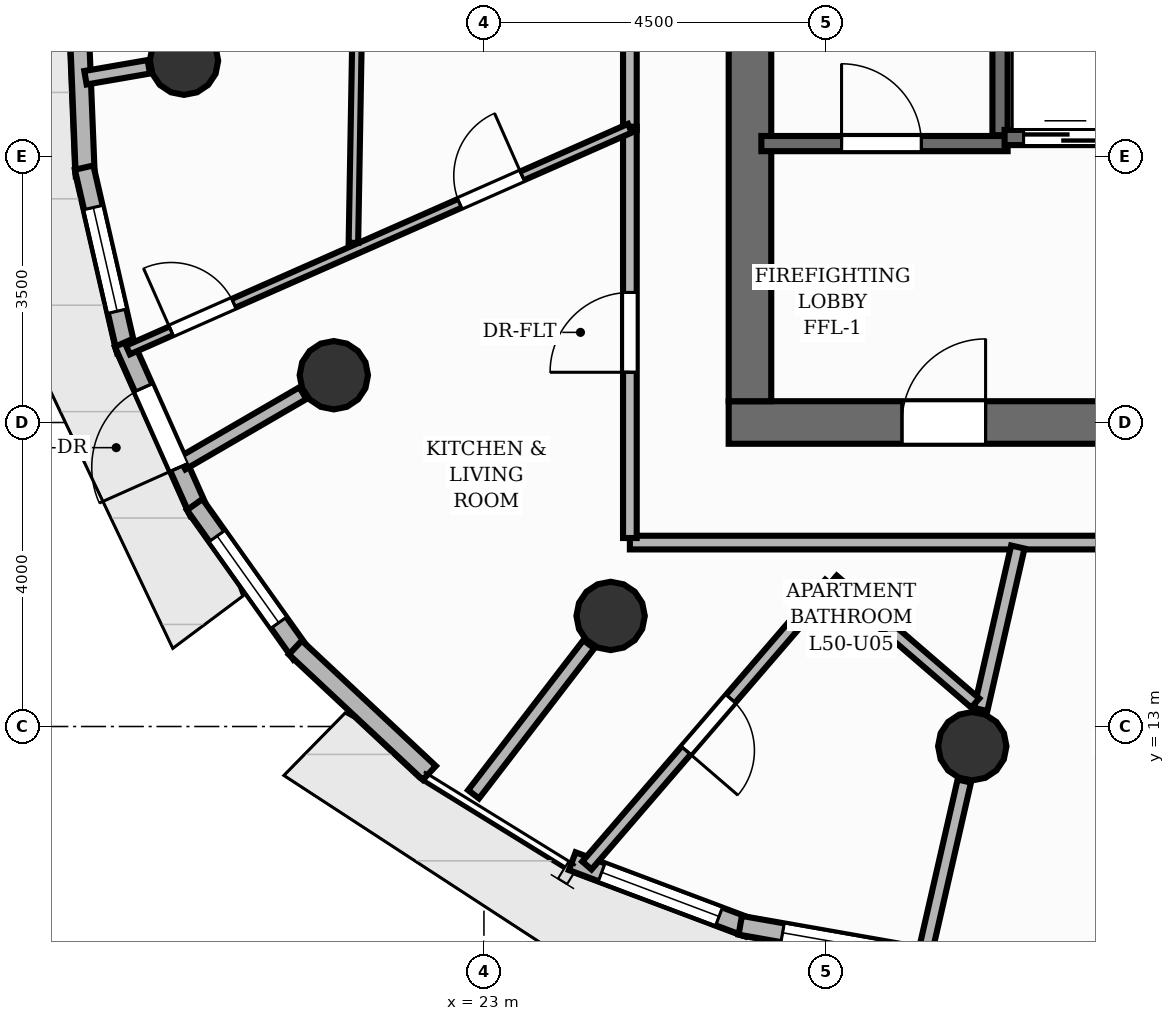
"""IFC4 building model, lengths in metres.
Left out: names, types, materials, properties, quantities, classifications, styles, units other than length and angle.
Written with IfcOpenShell. Run it as: python <this file> out.ifc"""

import sys

from ifc_helpers import new_model, si_unit, direction, frame, frame_2d, origin, origin_2d, place, context, subcontext, project, spatial, rectangle, circle, extrude, element, fill, save


model = new_model("IFC4")
c1 = context("Model", 3, precision=1e-05, world=origin(), true_north=direction((0.0, 1.0)))
c2 = subcontext(c1, "Body", "Model", "MODEL_VIEW")
j1 = project(units=[si_unit("LENGTHUNIT", "METRE"), si_unit("PLANEANGLEUNIT", "RADIAN")], contexts=[c1])
p1 = place(None, origin())
s1 = spatial("IfcSite", under=j1, at=p1, CompositionType="ELEMENT")
p2 = place(p1, origin())
s2 = spatial("IfcBuilding", under=s1, at=p2, CompositionType="ELEMENT")
p3 = place(p2, frame((0.0, 0.0, 169.44)))
s3 = spatial("IfcBuildingStorey", under=s2, at=p3, CompositionType="ELEMENT", Elevation=169.44)
p4 = place(p3, frame((26.22, 17.0, 0.0), z_axis=(0.0, 0.0, 1.0), x_axis=(1.0, 0.0, 0.0)))
e1 = element("IfcWall", 1, at=p4, inside=s3, PredefinedType="SHEAR", context=c2, shape_type="SweptSolid", body=[
    extrude(rectangle(XDim=11.56, YDim=0.56, at=frame_2d((5.78, 0.0))), origin(), (0.0, 0.0, 1.0), 3.2),
])
p5 = place(p4, frame((2.28, 0.0, 0.0)))
e2 = element("IfcOpeningElement", 2, at=p5, cuts=e1, PredefinedType="OPENING", context=c2, shape_type="SweptSolid", body=[
    extrude(rectangle(XDim=1.1, YDim=2.15, at=frame_2d((0.55, 1.075))), frame((0.0, 0.29, 0.0), z_axis=(0.0, -1.0, 0.0), x_axis=(1.0, 0.0, 0.0)), (0.0, 0.0, 1.0), 0.58),
])
p6 = place(p4, frame((5.83, 0.0, 0.0)))
e3 = element("IfcOpeningElement", 3, at=p6, cuts=e1, PredefinedType="OPENING", context=c2, shape_type="SweptSolid", body=[
    extrude(rectangle(XDim=0.9, YDim=2.1, at=frame_2d((0.45, 1.05))), frame((0.0, 0.29, 0.0), z_axis=(0.0, -1.0, 0.0), x_axis=(1.0, 0.0, 0.0)), (0.0, 0.0, 1.0), 0.58),
])
p7 = place(p3, frame((26.5, 17.28, 0.0), z_axis=(0.0, 0.0, 1.0), x_axis=(0.0, 1.0, 0.0)))
e4 = element("IfcWall", 4, at=p7, inside=s3, PredefinedType="SHEAR", context=c2, shape_type="SweptSolid", body=[
    extrude(rectangle(XDim=13.44, YDim=0.56, at=frame_2d((6.72, 0.0))), origin(), (0.0, 0.0, 1.0), 3.2),
])
for number, where, z_axis, x_axis in (
    (5, (19.054, 21.76, 0.0), (0.0, 0.0, 1.0), (1.0, 0.0, 0.0)),
    (6, (21.025, 17.622, 0.0), (0.0, 0.0, 1.0), (1.0, 0.0, 0.0)),
    (7, (24.667, 14.455, 0.0), (0.0, 0.0, 1.0), (1.0, 0.0, 0.0)),
    (8, (29.425, 12.74, 0.0), (0.0, 0.0, 1.0), (1.0, 0.0, 0.0)),
):
    element("IfcColumn", number, at=place(p3, frame(where, z_axis=z_axis, x_axis=x_axis)), inside=s3, PredefinedType="COLUMN", context=c2, shape_type="SweptSolid", body=[
        extrude(circle(Radius=0.45, at=origin_2d()), origin(), (0.0, 0.0, 1.0), 3.2),
    ])
p8 = place(p3, frame((17.755, 20.242, 0.0), z_axis=(0.0, 0.0, 1.0), x_axis=(-0.040399298921, 0.999183615081, 0.0)))
e9 = element("IfcWall", 9, at=p8, inside=s3, PredefinedType="SOLIDWALL", context=c2, shape_type="SweptSolid", body=[
    extrude(rectangle(XDim=2.532, YDim=0.25, at=frame_2d((1.266, 0.0))), origin(), (0.0, 0.0, 1.0), 2.96),
])
p9 = place(p3, frame((18.295, 17.939, 0.0), z_axis=(0.0, 0.0, 1.0), x_axis=(-0.224175769227, 0.974548728639, 0.0)))
e10 = element("IfcWall", 10, at=p9, inside=s3, PredefinedType="SOLIDWALL", context=c2, shape_type="SweptSolid", body=[
    extrude(rectangle(XDim=2.478, YDim=0.25, at=frame_2d((1.239, 0.0))), origin(), (0.0, 0.0, 1.0), 2.96),
])
p10 = place(p9, frame((0.539, 0.0, 0.85)))
e11 = element("IfcOpeningElement", 11, at=p10, cuts=e10, PredefinedType="OPENING", context=c2, shape_type="SweptSolid", body=[
    extrude(rectangle(XDim=1.4, YDim=1.55, at=frame_2d((0.7, 0.775))), frame((0.0, 0.135, 0.0), z_axis=(0.0, -1.0, 0.0), x_axis=(1.0, 0.0, 0.0)), (0.0, 0.0, 1.0), 0.27),
])
p11 = place(p3, frame((19.251, 15.821, 0.0), z_axis=(0.0, 0.0, 1.0), x_axis=(-0.407346511056, 0.913273682929, 0.0)))
e12 = element("IfcWall", 12, at=p11, inside=s3, PredefinedType="SOLIDWALL", context=c2, shape_type="SweptSolid", body=[
    extrude(rectangle(XDim=2.437, YDim=0.25, at=frame_2d((1.219, 0.0))), origin(), (0.0, 0.0, 1.0), 2.96),
])
p12 = place(p11, frame((0.643, 0.0, 0.0)))
e13 = element("IfcOpeningElement", 13, at=p12, cuts=e12, PredefinedType="OPENING", context=c2, shape_type="SweptSolid", body=[
    extrude(rectangle(XDim=1.15, YDim=2.2, at=frame_2d((0.575, 1.1))), frame((0.0, 0.135, 0.0), z_axis=(0.0, -1.0, 0.0), x_axis=(1.0, 0.0, 0.0)), (0.0, 0.0, 1.0), 0.27),
])
p13 = place(p3, frame((20.594, 13.953, 0.0), z_axis=(0.0, 0.0, 1.0), x_axis=(-0.579505880656, 0.814968057217, 0.0)))
e14 = element("IfcWall", 14, at=p13, inside=s3, PredefinedType="SOLIDWALL", context=c2, shape_type="SweptSolid", body=[
    extrude(rectangle(XDim=2.415, YDim=0.25, at=frame_2d((1.208, 0.0))), origin(), (0.0, 0.0, 1.0), 2.96),
])
p14 = place(p13, frame((0.507, 0.0, 0.85)))
e15 = element("IfcOpeningElement", 15, at=p14, cuts=e14, PredefinedType="OPENING", context=c2, shape_type="SweptSolid", body=[
    extrude(rectangle(XDim=1.4, YDim=1.55, at=frame_2d((0.7, 0.775))), frame((0.0, 0.135, 0.0), z_axis=(0.0, -1.0, 0.0), x_axis=(1.0, 0.0, 0.0)), (0.0, 0.0, 1.0), 0.27),
])
p15 = place(p3, frame((22.282, 12.389, 0.0), z_axis=(0.0, 0.0, 1.0), x_axis=(-0.730224222865, 0.683207570465, 0.0)))
e16 = element("IfcWall", 16, at=p15, inside=s3, PredefinedType="SOLIDWALL", context=c2, shape_type="SweptSolid", body=[
    extrude(rectangle(XDim=2.415, YDim=0.25, at=frame_2d((1.207, 0.0))), origin(), (0.0, 0.0, 1.0), 2.96),
])
p16 = place(p3, frame((26.481, 10.355, 0.0), z_axis=(0.0, 0.0, 1.0), x_axis=(-0.93586674787, 0.352354126172, 0.0)))
e17 = element("IfcWall", 17, at=p16, inside=s3, PredefinedType="SOLIDWALL", context=c2, shape_type="SweptSolid", body=[
    extrude(rectangle(XDim=2.478, YDim=0.25, at=frame_2d((1.239, 0.0))), origin(), (0.0, 0.0, 1.0), 2.96),
])
p17 = place(p16, frame((0.414, 0.0, 0.85)))
e18 = element("IfcOpeningElement", 18, at=p17, cuts=e17, PredefinedType="OPENING", context=c2, shape_type="SweptSolid", body=[
    extrude(rectangle(XDim=1.65, YDim=1.55, at=frame_2d((0.825, 0.775))), frame((0.0, 0.135, 0.0), z_axis=(0.0, -1.0, 0.0), x_axis=(1.0, 0.0, 0.0)), (0.0, 0.0, 1.0), 0.27),
])
p18 = place(p3, frame((28.865, 9.945, 0.0), z_axis=(0.0, 0.0, 1.0), x_axis=(-0.984837873762, 0.173477267688, 0.0)))
e19 = element("IfcWall", 19, at=p18, inside=s3, PredefinedType="SOLIDWALL", context=c2, shape_type="SweptSolid", body=[
    extrude(rectangle(XDim=2.532, YDim=0.25, at=frame_2d((1.266, 0.0))), origin(), (0.0, 0.0, 1.0), 2.96),
])
p19 = place(p18, frame((0.566, 0.0, 0.85)))
e20 = element("IfcOpeningElement", 20, at=p19, cuts=e19, PredefinedType="OPENING", context=c2, shape_type="SweptSolid", body=[
    extrude(rectangle(XDim=1.4, YDim=1.55, at=frame_2d((0.7, 0.775))), frame((0.0, 0.135, 0.0), z_axis=(0.0, -1.0, 0.0), x_axis=(1.0, 0.0, 0.0)), (0.0, 0.0, 1.0), 0.27),
])
p20 = place(p3, frame((29.79, 20.78, 0.0), z_axis=(0.0, 0.0, 1.0), x_axis=(0.0, 1.0, 0.0)))
e21 = element("IfcWall", 21, at=p20, inside=s3, PredefinedType="SHEAR", context=c2, shape_type="SweptSolid", body=[
    extrude(rectangle(XDim=6.44, YDim=0.2, at=frame_2d((3.22, 0.0))), origin(), (0.0, 0.0, 1.0), 3.2),
])
p21 = place(p3, frame((26.65, 20.67, 0.0), z_axis=(0.0, 0.0, 1.0), x_axis=(1.0, 0.0, 0.0)))
e22 = element("IfcWall", 22, at=p21, inside=s3, PredefinedType="SHEAR", context=c2, shape_type="SweptSolid", body=[
    extrude(rectangle(XDim=3.24, YDim=0.2, at=frame_2d((1.62, 0.0))), origin(), (0.0, 0.0, 1.0), 3.2),
])
p22 = place(p21, frame((1.055, 0.0, 0.0)))
e23 = element("IfcOpeningElement", 23, at=p22, cuts=e22, PredefinedType="OPENING", context=c2, shape_type="SweptSolid", body=[
    extrude(rectangle(XDim=1.05, YDim=2.15, at=frame_2d((0.525, 1.075))), frame((0.0, 0.11, 0.0), z_axis=(0.0, -1.0, 0.0), x_axis=(1.0, 0.0, 0.0)), (0.0, 0.0, 1.0), 0.22),
])
p23 = place(p3, frame((29.85, 20.75, 0.0), z_axis=(0.0, 0.0, 1.0), x_axis=(1.0, 0.0, 0.0)))
e24 = element("IfcWall", 24, at=p23, inside=s3, PredefinedType="SHEAR", context=c2, shape_type="SweptSolid", body=[
    extrude(rectangle(XDim=2.3, YDim=0.2, at=frame_2d((1.15, 0.0))), origin(), (0.0, 0.0, 1.0), 3.2),
])
p24 = place(p23, frame((0.25, 0.0, 0.0)))
e25 = element("IfcOpeningElement", 25, at=p24, cuts=e24, PredefinedType="OPENING", context=c2, shape_type="SweptSolid", body=[
    extrude(rectangle(XDim=1.1, YDim=2.15, at=frame_2d((0.55, 1.075))), frame((0.0, 0.11, 0.0), z_axis=(0.0, -1.0, 0.0), x_axis=(1.0, 0.0, 0.0)), (0.0, 0.0, 1.0), 0.22),
])
p25 = place(p3, frame((18.591, 21.68, 0.0), z_axis=(0.0, 0.0, 1.0), x_axis=(-0.985336508055, -0.170622290144, 0.0)))
e26 = element("IfcWall", 26, at=p25, inside=s3, PredefinedType="PARTITIONING", context=c2, shape_type="SweptSolid", body=[
    extrude(rectangle(XDim=0.846, YDim=0.18, at=frame_2d((0.423, 0.0))), origin(), (0.0, 0.0, 1.0), 2.404),
])
p26 = place(p3, frame((20.618, 17.386, 0.0), z_axis=(0.0, 0.0, 1.0), x_axis=(-0.864604991586, -0.502452195264, 0.0)))
e27 = element("IfcWall", 27, at=p26, inside=s3, PredefinedType="PARTITIONING", context=c2, shape_type="SweptSolid", body=[
    extrude(rectangle(XDim=1.841, YDim=0.18, at=frame_2d((0.92, 0.0))), origin(), (0.0, 0.0, 1.0), 2.404),
])
p27 = place(p3, frame((24.38, 14.082, 0.0), z_axis=(0.0, 0.0, 1.0), x_axis=(-0.609279402228, -0.792955616678, 0.0)))
e28 = element("IfcWall", 28, at=p27, inside=s3, PredefinedType="PARTITIONING", context=c2, shape_type="SweptSolid", body=[
    extrude(rectangle(XDim=2.49, YDim=0.18, at=frame_2d((1.245, 0.0))), origin(), (0.0, 0.0, 1.0), 2.404),
])
p28 = place(p3, frame((29.32, 12.282, 0.0), z_axis=(0.0, 0.0, 1.0), x_axis=(-0.222998449778, -0.974818799263, 0.0)))
e29 = element("IfcWall", 29, at=p28, inside=s3, PredefinedType="PARTITIONING", context=c2, shape_type="SweptSolid", body=[
    extrude(rectangle(XDim=2.329, YDim=0.18, at=frame_2d((1.164, 0.0))), origin(), (0.0, 0.0, 1.0), 2.404),
])
p29 = place(p3, frame((39.08, 15.42, 0.0), z_axis=(0.0, 0.0, 1.0), x_axis=(-1.0, 0.0, 0.0)))
e30 = element("IfcWall", 30, at=p29, inside=s3, PredefinedType="PARTITIONING", context=c2, shape_type="SweptSolid", body=[
    extrude(rectangle(XDim=14.16, YDim=0.18, at=frame_2d((7.08, 0.0))), origin(), (0.0, 0.0, 1.0), 2.955),
])
p30 = place(p29, frame((2.007, 0.0, 0.0)))
e31 = element("IfcOpeningElement", 31, at=p30, cuts=e30, PredefinedType="OPENING", context=c2, shape_type="SweptSolid", body=[
    extrude(rectangle(XDim=0.9, YDim=2.1, at=frame_2d((0.45, 1.05))), frame((0.0, 0.1, 0.0), z_axis=(0.0, -1.0, 0.0), x_axis=(1.0, 0.0, 0.0)), (0.0, 0.0, 1.0), 0.2),
])
p31 = place(p29, frame((6.287, 0.0, 0.0)))
e32 = element("IfcOpeningElement", 32, at=p31, cuts=e30, PredefinedType="OPENING", context=c2, shape_type="SweptSolid", body=[
    extrude(rectangle(XDim=0.9, YDim=2.1, at=frame_2d((0.45, 1.05))), frame((0.0, 0.1, 0.0), z_axis=(0.0, -1.0, 0.0), x_axis=(1.0, 0.0, 0.0)), (0.0, 0.0, 1.0), 0.2),
])
p32 = place(p3, frame((24.92, 20.85, 0.0), z_axis=(0.0, 0.0, 1.0), x_axis=(0.0, 1.0, 0.0)))
e33 = element("IfcWall", 33, at=p32, inside=s3, PredefinedType="PARTITIONING", context=c2, shape_type="SweptSolid", body=[
    extrude(rectangle(XDim=11.67, YDim=0.18, at=frame_2d((5.835, 0.0))), origin(), (0.0, 0.0, 1.0), 2.955),
])
p33 = place(p3, frame((24.92, 15.48, 0.0), z_axis=(0.0, 0.0, 1.0), x_axis=(0.0, 1.0, 0.0)))
e34 = element("IfcWall", 34, at=p33, inside=s3, PredefinedType="PARTITIONING", context=c2, shape_type="SweptSolid", body=[
    extrude(rectangle(XDim=5.412, YDim=0.18, at=frame_2d((2.706, 0.0))), origin(), (0.0, 0.0, 1.0), 2.955),
])
p34 = place(p33, frame((2.181, 0.0, 0.0)))
e35 = element("IfcOpeningElement", 35, at=p34, cuts=e34, PredefinedType="OPENING", context=c2, shape_type="SweptSolid", body=[
    extrude(rectangle(XDim=1.05, YDim=2.15, at=frame_2d((0.525, 1.075))), frame((0.0, 0.1, 0.0), z_axis=(0.0, -1.0, 0.0), x_axis=(1.0, 0.0, 0.0)), (0.0, 0.0, 1.0), 0.2),
])
p35 = place(p3, frame((29.535, 13.224, 0.0), z_axis=(0.0, 0.0, 1.0), x_axis=(0.222891307908, 0.97484330272, 0.0)))
e36 = element("IfcWall", 36, at=p35, inside=s3, PredefinedType="PARTITIONING", context=c2, shape_type="SweptSolid", body=[
    extrude(rectangle(XDim=2.193, YDim=0.18, at=frame_2d((1.096, 0.0))), origin(), (0.0, 0.0, 1.0), 2.404),
])
p36 = place(p3, frame((29.464, 13.309, 0.0), z_axis=(0.0, 0.0, 1.0), x_axis=(-0.757457065386, 0.652884977693, 0.0)))
e37 = element("IfcWall", 37, at=p36, inside=s3, PredefinedType="PLUMBINGWALL", context=c2, shape_type="SweptSolid", body=[
    extrude(rectangle(XDim=2.475, YDim=0.16, at=frame_2d((1.237, 0.0))), origin(), (0.0, 0.0, 1.0), 2.955),
])
p37 = place(p3, frame((27.55, 14.879, 0.0), z_axis=(0.0, 0.0, 1.0), x_axis=(-0.652871537105, -0.757468650201, 0.0)))
e38 = element("IfcWall", 38, at=p37, inside=s3, PredefinedType="PLUMBINGWALL", context=c2, shape_type="SweptSolid", body=[
    extrude(rectangle(XDim=4.895, YDim=0.16, at=frame_2d((2.447, 0.0))), origin(), (0.0, 0.0, 1.0), 2.955),
])
p38 = place(p37, frame((1.997, 0.0, 0.0)))
e39 = element("IfcOpeningElement", 39, at=p38, cuts=e38, PredefinedType="OPENING", context=c2, shape_type="SweptSolid", body=[
    extrude(rectangle(XDim=0.9, YDim=2.1, at=frame_2d((0.45, 1.05))), frame((0.0, 0.09, 0.0), z_axis=(0.0, -1.0, 0.0), x_axis=(1.0, 0.0, 0.0)), (0.0, 0.0, 1.0), 0.18),
])
p39 = place(p3, frame((18.317, 17.954, 0.0), z_axis=(0.0, 0.0, 1.0), x_axis=(0.914699105929, 0.404135553512, 0.0)))
e40 = element("IfcWall", 40, at=p39, inside=s3, PredefinedType="PARTITIONING", context=c2, shape_type="SweptSolid", body=[
    extrude(rectangle(XDim=7.219, YDim=0.125, at=frame_2d((3.609, 0.0))), origin(), (0.0, 0.0, 1.0), 2.692),
])
p40 = place(p39, frame((0.621, 0.0, 0.0)))
e41 = element("IfcOpeningElement", 41, at=p40, cuts=e40, PredefinedType="OPENING", context=c2, shape_type="SweptSolid", body=[
    extrude(rectangle(XDim=0.9, YDim=2.1, at=frame_2d((0.45, 1.05))), frame((0.0, 0.073, 0.0), z_axis=(0.0, -1.0, 0.0), x_axis=(1.0, 0.0, 0.0)), (0.0, 0.0, 1.0), 0.145),
])
p41 = place(p39, frame((4.77, 0.0, 0.0)))
e42 = element("IfcOpeningElement", 42, at=p41, cuts=e40, PredefinedType="OPENING", context=c2, shape_type="SweptSolid", body=[
    extrude(rectangle(XDim=0.9, YDim=2.1, at=frame_2d((0.45, 1.05))), frame((0.0, 0.073, 0.0), z_axis=(0.0, -1.0, 0.0), x_axis=(1.0, 0.0, 0.0)), (0.0, 0.0, 1.0), 0.145),
])
p42 = place(p3, frame((21.469, 30.019, 0.0), z_axis=(0.0, 0.0, 1.0), x_axis=(-0.017526694913, -0.999846395686, 0.0)))
e43 = element("IfcWall", 43, at=p42, inside=s3, PredefinedType="PARTITIONING", context=c2, shape_type="SweptSolid", body=[
    extrude(rectangle(XDim=10.656, YDim=0.125, at=frame_2d((5.328, 0.0))), origin(), (0.0, 0.0, 1.0), 2.955),
])
p43 = place(p12, origin())
e44 = element("IfcDoor", 44, at=p43, inside=s3, OperationType="SINGLE_SWING_LEFT", PredefinedType="DOOR", context=c2, shape_type="SweptSolid", body=[
    extrude(rectangle(XDim=1.15, YDim=2.2, at=frame_2d((0.575, 1.1))), frame((0.0, 0.025, 0.0), z_axis=(0.0, -1.0, 0.0), x_axis=(1.0, 0.0, 0.0)), (0.0, 0.0, 1.0), 0.05),
])
fill(e13, e44)
p44 = place(p10, origin())
e45 = element("IfcWindow", 45, at=p44, inside=s3, PartitioningType="SINGLE_PANEL", PredefinedType="WINDOW", context=c2, shape_type="SweptSolid", body=[
    extrude(rectangle(XDim=1.4, YDim=1.55, at=frame_2d((0.7, 0.775))), frame((0.0, 0.03, 0.0), z_axis=(0.0, -1.0, 0.0), x_axis=(1.0, 0.0, 0.0)), (0.0, 0.0, 1.0), 0.06),
])
fill(e11, e45)
p45 = place(p14, origin())
e46 = element("IfcWindow", 46, at=p45, inside=s3, PartitioningType="SINGLE_PANEL", PredefinedType="WINDOW", context=c2, shape_type="SweptSolid", body=[
    extrude(rectangle(XDim=1.4, YDim=1.55, at=frame_2d((0.7, 0.775))), frame((0.0, 0.03, 0.0), z_axis=(0.0, -1.0, 0.0), x_axis=(1.0, 0.0, 0.0)), (0.0, 0.0, 1.0), 0.06),
])
fill(e15, e46)
p46 = place(p17, origin())
e47 = element("IfcWindow", 47, at=p46, inside=s3, PartitioningType="SINGLE_PANEL", PredefinedType="WINDOW", context=c2, shape_type="SweptSolid", body=[
    extrude(rectangle(XDim=1.65, YDim=1.55, at=frame_2d((0.825, 0.775))), frame((0.0, 0.03, 0.0), z_axis=(0.0, -1.0, 0.0), x_axis=(1.0, 0.0, 0.0)), (0.0, 0.0, 1.0), 0.06),
])
fill(e18, e47)
p47 = place(p19, origin())
e48 = element("IfcWindow", 48, at=p47, inside=s3, PartitioningType="SINGLE_PANEL", PredefinedType="WINDOW", context=c2, shape_type="SweptSolid", body=[
    extrude(rectangle(XDim=1.4, YDim=1.55, at=frame_2d((0.7, 0.775))), frame((0.0, 0.03, 0.0), z_axis=(0.0, -1.0, 0.0), x_axis=(1.0, 0.0, 0.0)), (0.0, 0.0, 1.0), 0.06),
])
fill(e20, e48)
p48 = place(p22, origin())
e49 = element("IfcDoor", 49, at=p48, inside=s3, OperationType="SINGLE_SWING_LEFT", PredefinedType="DOOR", context=c2, shape_type="SweptSolid", body=[
    extrude(rectangle(XDim=1.05, YDim=2.15, at=frame_2d((0.525, 1.075))), frame((0.0, 0.025, 0.0), z_axis=(0.0, -1.0, 0.0), x_axis=(1.0, 0.0, 0.0)), (0.0, 0.0, 1.0), 0.05),
])
fill(e23, e49)
p49 = place(p5, origin())
e50 = element("IfcDoor", 50, at=p49, inside=s3, OperationType="SINGLE_SWING_RIGHT", PredefinedType="DOOR", context=c2, shape_type="SweptSolid", body=[
    extrude(rectangle(XDim=1.1, YDim=2.15, at=frame_2d((0.55, 1.075))), frame((0.0, 0.025, 0.0), z_axis=(0.0, -1.0, 0.0), x_axis=(1.0, 0.0, 0.0)), (0.0, 0.0, 1.0), 0.05),
])
fill(e2, e50)
p50 = place(p24, origin())
e51 = element("IfcDoor", 51, at=p50, inside=s3, OperationType="DOUBLE_DOOR_SLIDING", PredefinedType="DOOR", context=c2, shape_type="SweptSolid", body=[
    extrude(rectangle(XDim=1.1, YDim=2.15, at=frame_2d((0.55, 1.075))), frame((0.0, 0.025, 0.0), z_axis=(0.0, -1.0, 0.0), x_axis=(1.0, 0.0, 0.0)), (0.0, 0.0, 1.0), 0.05),
])
fill(e25, e51)
p51 = place(p34, origin())
e52 = element("IfcDoor", 52, at=p51, inside=s3, OperationType="SINGLE_SWING_LEFT", PredefinedType="DOOR", context=c2, shape_type="SweptSolid", body=[
    extrude(rectangle(XDim=1.05, YDim=2.15, at=frame_2d((0.525, 1.075))), frame((0.0, 0.025, 0.0), z_axis=(0.0, -1.0, 0.0), x_axis=(1.0, 0.0, 0.0)), (0.0, 0.0, 1.0), 0.05),
])
fill(e35, e52)
p52 = place(p38, origin())
e53 = element("IfcDoor", 53, at=p52, inside=s3, OperationType="SINGLE_SWING_RIGHT", PredefinedType="DOOR", context=c2, shape_type="SweptSolid", body=[
    extrude(rectangle(XDim=0.9, YDim=2.1, at=frame_2d((0.45, 1.05))), frame((0.0, 0.025, 0.0), z_axis=(0.0, -1.0, 0.0), x_axis=(1.0, 0.0, 0.0)), (0.0, 0.0, 1.0), 0.05),
])
fill(e39, e53)
p53 = place(p40, origin())
e54 = element("IfcDoor", 54, at=p53, inside=s3, OperationType="SINGLE_SWING_LEFT", PredefinedType="DOOR", context=c2, shape_type="SweptSolid", body=[
    extrude(rectangle(XDim=0.9, YDim=2.1, at=frame_2d((0.45, 1.05))), frame((0.0, 0.025, 0.0), z_axis=(0.0, -1.0, 0.0), x_axis=(1.0, 0.0, 0.0)), (0.0, 0.0, 1.0), 0.05),
])
fill(e41, e54)
p54 = place(p41, origin())
e55 = element("IfcDoor", 55, at=p54, inside=s3, OperationType="SINGLE_SWING_RIGHT", PredefinedType="DOOR", context=c2, shape_type="SweptSolid", body=[
    extrude(rectangle(XDim=0.9, YDim=2.1, at=frame_2d((0.45, 1.05))), frame((0.0, 0.025, 0.0), z_axis=(0.0, -1.0, 0.0), x_axis=(1.0, 0.0, 0.0)), (0.0, 0.0, 1.0), 0.05),
])
fill(e42, e55)
save(model, sys.argv[1])
